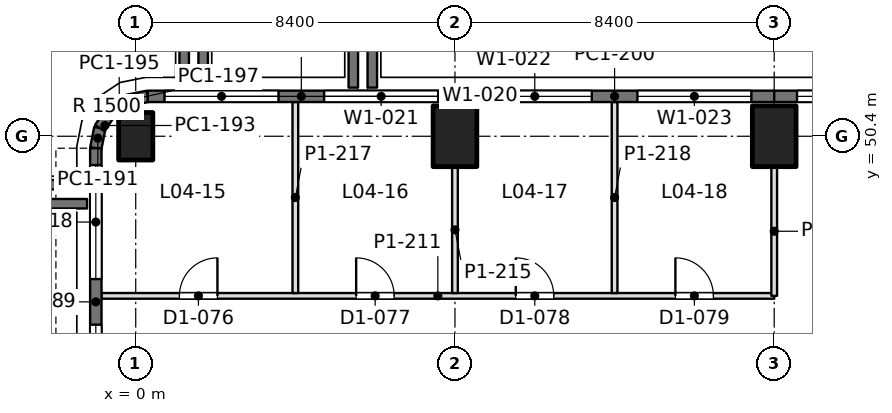
"""IFC4 building model, lengths in metres.
Left out: names, types, materials, properties, quantities, classifications, styles, units other than length and angle.
Written with IfcOpenShell. Run it as: python <this file> out.ifc"""

import sys

from ifc_helpers import new_model, si_unit, direction, frame, frame_2d, origin, origin_2d, place, context, subcontext, project, spatial, rectangle, extrude, element, fill, save


model = new_model("IFC4")
c1 = context("Model", 3, precision=1e-05, world=origin(), true_north=direction((0.0, 1.0)))
c2 = subcontext(c1, "Body", "Model", "MODEL_VIEW")
j1 = project(units=[si_unit("LENGTHUNIT", "METRE"), si_unit("PLANEANGLEUNIT", "RADIAN")], contexts=[c1])
p1 = place(None, origin())
s1 = spatial("IfcSite", under=j1, at=p1, CompositionType="ELEMENT")
p2 = place(p1, origin())
s2 = spatial("IfcBuilding", under=s1, at=p2, CompositionType="ELEMENT")
p3 = place(p2, frame((0.0, 0.0, 18.9)))
s3 = spatial("IfcBuildingStorey", under=s2, at=p3, CompositionType="ELEMENT", Elevation=18.9)
p4 = place(p3, frame((0.0, 50.4, 0.0), z_axis=(0.0, 0.0, 1.0), x_axis=(1.0, 0.0, 0.0)))
e1 = element("IfcColumn", 1, at=p4, inside=s3, PredefinedType="COLUMN", context=c2, shape_type="SweptSolid", body=[
    extrude(rectangle(XDim=0.9, YDim=1.25, at=origin_2d()), origin(), (0.0, 0.0, 1.0), 4.5),
])
for number, where, z_axis, x_axis in (
    (2, (8.4, 50.4, 0.0), (0.0, 0.0, 1.0), (1.0, 0.0, 0.0)),
    (3, (16.8, 50.4, 0.0), (0.0, 0.0, 1.0), (1.0, 0.0, 0.0)),
):
    element("IfcColumn", number, at=place(p3, frame(where, z_axis=z_axis, x_axis=x_axis)), inside=s3, PredefinedType="COLUMN", context=c2, shape_type="SweptSolid", body=[
        extrude(rectangle(XDim=1.15, YDim=1.6, at=origin_2d()), origin(), (0.0, 0.0, 1.0), 4.5),
    ])
p5 = place(p3, frame((-1.05, 42.0, 0.0), z_axis=(0.0, 0.0, 1.0), x_axis=(0.0, 1.0, 0.0)))
e4 = element("IfcWall", 4, at=p5, inside=s3, PredefinedType="SOLIDWALL", context=c2, shape_type="SweptSolid", body=[
    extrude(rectangle(XDim=8.085, YDim=0.3, at=frame_2d((4.042, 0.0))), origin(), (0.0, 0.0, 1.0), 4.34),
])
p6 = place(p5, frame((0.443, 0.0, 0.9)))
e5 = element("IfcOpeningElement", 5, at=p6, cuts=e4, PredefinedType="OPENING", context=c2, shape_type="SweptSolid", body=[
    extrude(rectangle(XDim=3.0, YDim=1.9, at=frame_2d((1.5, 0.95))), frame((0.0, 0.16, 0.0), z_axis=(0.0, -1.0, 0.0), x_axis=(1.0, 0.0, 0.0)), (0.0, 0.0, 1.0), 0.32),
])
p7 = place(p5, frame((4.643, 0.0, 0.9)))
e6 = element("IfcOpeningElement", 6, at=p7, cuts=e4, PredefinedType="OPENING", context=c2, shape_type="SweptSolid", body=[
    extrude(rectangle(XDim=3.0, YDim=1.9, at=frame_2d((1.5, 0.95))), frame((0.0, 0.16, 0.0), z_axis=(0.0, -1.0, 0.0), x_axis=(1.0, 0.0, 0.0)), (0.0, 0.0, 1.0), 0.32),
])
p8 = place(p3, frame((-1.05, 50.085, 0.0), z_axis=(0.0, 0.0, 1.0), x_axis=(0.195073962632, 0.980788534345, 0.0)))
e7 = element("IfcWall", 7, at=p8, inside=s3, PredefinedType="SOLIDWALL", context=c2, shape_type="SweptSolid", body=[
    extrude(rectangle(XDim=0.541, YDim=0.3, at=frame_2d((0.271, 0.0))), origin(), (0.0, 0.0, 1.0), 4.34),
])
for number, where, z_axis, x_axis in (
    (8, (-0.945, 50.615, 0.0), (0.0, 0.0, 1.0), (0.556, 0.831, 0.0)),
    (9, (-0.653, 51.052, 0.0), (0.0, 0.0, 1.0), (0.831, 0.556, 0.0)),
):
    element("IfcWall", number, at=place(p3, frame(where, z_axis=z_axis, x_axis=x_axis)), inside=s3, PredefinedType="SOLIDWALL", context=c2, shape_type="SweptSolid", body=[
        extrude(rectangle(XDim=0.526, YDim=0.3, at=frame_2d((0.263, 0.0))), origin(), (0.0, 0.0, 1.0), 4.34),
    ])
p9 = place(p3, frame((-0.216, 51.344, 0.0), z_axis=(0.0, 0.0, 1.0), x_axis=(0.980788534345, 0.195073962632, 0.0)))
e10 = element("IfcWall", 10, at=p9, inside=s3, PredefinedType="SOLIDWALL", context=c2, shape_type="SweptSolid", body=[
    extrude(rectangle(XDim=0.541, YDim=0.3, at=frame_2d((0.271, 0.0))), origin(), (0.0, 0.0, 1.0), 4.34),
])
p10 = place(p3, frame((0.315, 51.45, 0.0), z_axis=(0.0, 0.0, 1.0), x_axis=(1.0, 0.0, 0.0)))
e11 = element("IfcWall", 11, at=p10, inside=s3, PredefinedType="SOLIDWALL", context=c2, shape_type="SweptSolid", body=[
    extrude(rectangle(XDim=8.085, YDim=0.3, at=frame_2d((4.042, 0.0))), origin(), (0.0, 0.0, 1.0), 4.34),
])
p11 = place(p10, frame((0.443, 0.0, 0.9)))
e12 = element("IfcOpeningElement", 12, at=p11, cuts=e11, PredefinedType="OPENING", context=c2, shape_type="SweptSolid", body=[
    extrude(rectangle(XDim=3.0, YDim=1.9, at=frame_2d((1.5, 0.95))), frame((0.0, 0.16, 0.0), z_axis=(0.0, -1.0, 0.0), x_axis=(1.0, 0.0, 0.0)), (0.0, 0.0, 1.0), 0.32),
])
p12 = place(p10, frame((4.643, 0.0, 0.9)))
e13 = element("IfcOpeningElement", 13, at=p12, cuts=e11, PredefinedType="OPENING", context=c2, shape_type="SweptSolid", body=[
    extrude(rectangle(XDim=3.0, YDim=1.9, at=frame_2d((1.5, 0.95))), frame((0.0, 0.16, 0.0), z_axis=(0.0, -1.0, 0.0), x_axis=(1.0, 0.0, 0.0)), (0.0, 0.0, 1.0), 0.32),
])
p13 = place(p3, frame((8.4, 51.45, 0.0), z_axis=(0.0, 0.0, 1.0), x_axis=(1.0, 0.0, 0.0)))
e14 = element("IfcWall", 14, at=p13, inside=s3, PredefinedType="SOLIDWALL", context=c2, shape_type="SweptSolid", body=[
    extrude(rectangle(XDim=8.4, YDim=0.3, at=frame_2d((4.2, 0.0))), origin(), (0.0, 0.0, 1.0), 4.34),
])
p14 = place(p13, frame((0.6, 0.0, 0.9)))
e15 = element("IfcOpeningElement", 15, at=p14, cuts=e14, PredefinedType="OPENING", context=c2, shape_type="SweptSolid", body=[
    extrude(rectangle(XDim=3.0, YDim=1.9, at=frame_2d((1.5, 0.95))), frame((0.0, 0.16, 0.0), z_axis=(0.0, -1.0, 0.0), x_axis=(1.0, 0.0, 0.0)), (0.0, 0.0, 1.0), 0.32),
])
p15 = place(p13, frame((4.8, 0.0, 0.9)))
e16 = element("IfcOpeningElement", 16, at=p15, cuts=e14, PredefinedType="OPENING", context=c2, shape_type="SweptSolid", body=[
    extrude(rectangle(XDim=3.0, YDim=1.9, at=frame_2d((1.5, 0.95))), frame((0.0, 0.16, 0.0), z_axis=(0.0, -1.0, 0.0), x_axis=(1.0, 0.0, 0.0)), (0.0, 0.0, 1.0), 0.32),
])
p16 = place(p3, frame((16.8, 51.45, 0.0), z_axis=(0.0, 0.0, 1.0), x_axis=(1.0, 0.0, 0.0)))
e17 = element("IfcWall", 17, at=p16, inside=s3, PredefinedType="SOLIDWALL", context=c2, shape_type="SweptSolid", body=[
    extrude(rectangle(XDim=8.4, YDim=0.3, at=frame_2d((4.2, 0.0))), origin(), (0.0, 0.0, 1.0), 4.34),
])
p17 = place(p16, frame((0.6, 0.0, 0.9)))
e18 = element("IfcOpeningElement", 18, at=p17, cuts=e17, PredefinedType="OPENING", context=c2, shape_type="SweptSolid", body=[
    extrude(rectangle(XDim=3.0, YDim=1.9, at=frame_2d((1.5, 0.95))), frame((0.0, 0.16, 0.0), z_axis=(0.0, -1.0, 0.0), x_axis=(1.0, 0.0, 0.0)), (0.0, 0.0, 1.0), 0.32),
])
p18 = place(p16, frame((4.8, 0.0, 0.9)))
e19 = element("IfcOpeningElement", 19, at=p18, cuts=e17, PredefinedType="OPENING", context=c2, shape_type="SweptSolid", body=[
    extrude(rectangle(XDim=3.0, YDim=1.9, at=frame_2d((1.5, 0.95))), frame((0.0, 0.16, 0.0), z_axis=(0.0, -1.0, 0.0), x_axis=(1.0, 0.0, 0.0)), (0.0, 0.0, 1.0), 0.32),
])
for number, where, z_axis, x_axis in (
    (20, (6.225, 51.68, 0.0), (0.0, 0.0, 1.0), (0.0, 1.0, 0.0)),
    (21, (5.725, 59.68, 0.0), (0.0, 0.0, 1.0), (0.0, -1.0, 0.0)),
    (22, (1.775, 51.68, 0.0), (0.0, 0.0, 1.0), (0.0, 1.0, 0.0)),
    (23, (1.275, 59.68, 0.0), (0.0, 0.0, 1.0), (0.0, -1.0, 0.0)),
    (24, (-1.28, 49.125, 0.0), (0.0, 0.0, 1.0), (-1.0, 0.0, 0.0)),
    (25, (-9.28, 48.625, 0.0), (0.0, 0.0, 1.0), (1.0, 0.0, 0.0)),
):
    element("IfcWall", number, at=place(p3, frame(where, z_axis=z_axis, x_axis=x_axis)), inside=s3, PredefinedType="PARAPET", context=c2, shape_type="SweptSolid", body=[
        extrude(rectangle(XDim=8.0, YDim=0.25, at=frame_2d((4.0, 0.0))), origin(), (0.0, 0.0, 1.0), 1.1),
    ])
p19 = place(p3, frame((-0.902, 46.2, 0.0), z_axis=(0.0, 0.0, 1.0), x_axis=(1.0, 0.0, 0.0)))
e26 = element("IfcWall", 26, at=p19, inside=s3, PredefinedType="PARTITIONING", context=c2, shape_type="SweptSolid", body=[
    extrude(rectangle(XDim=17.702, YDim=0.15, at=frame_2d((8.851, 0.0))), origin(), (0.0, 0.0, 1.0), 3.74),
])
p20 = place(p19, frame((2.052, 0.0, 0.0)))
e27 = element("IfcOpeningElement", 27, at=p20, cuts=e26, PredefinedType="OPENING", context=c2, shape_type="SweptSolid", body=[
    extrude(rectangle(XDim=1.0, YDim=2.2, at=frame_2d((0.5, 1.1))), frame((0.0, 0.085, 0.0), z_axis=(0.0, -1.0, 0.0), x_axis=(1.0, 0.0, 0.0)), (0.0, 0.0, 1.0), 0.17),
])
p21 = place(p19, frame((6.702, 0.0, 0.0)))
e28 = element("IfcOpeningElement", 28, at=p21, cuts=e26, PredefinedType="OPENING", context=c2, shape_type="SweptSolid", body=[
    extrude(rectangle(XDim=1.0, YDim=2.2, at=frame_2d((0.5, 1.1))), frame((0.0, 0.085, 0.0), z_axis=(0.0, -1.0, 0.0), x_axis=(1.0, 0.0, 0.0)), (0.0, 0.0, 1.0), 0.17),
])
p22 = place(p19, frame((10.902, 0.0, 0.0)))
e29 = element("IfcOpeningElement", 29, at=p22, cuts=e26, PredefinedType="OPENING", context=c2, shape_type="SweptSolid", body=[
    extrude(rectangle(XDim=1.0, YDim=2.2, at=frame_2d((0.5, 1.1))), frame((0.0, 0.085, 0.0), z_axis=(0.0, -1.0, 0.0), x_axis=(1.0, 0.0, 0.0)), (0.0, 0.0, 1.0), 0.17),
])
p23 = place(p19, frame((15.102, 0.0, 0.0)))
e30 = element("IfcOpeningElement", 30, at=p23, cuts=e26, PredefinedType="OPENING", context=c2, shape_type="SweptSolid", body=[
    extrude(rectangle(XDim=1.0, YDim=2.2, at=frame_2d((0.5, 1.1))), frame((0.0, 0.085, 0.0), z_axis=(0.0, -1.0, 0.0), x_axis=(1.0, 0.0, 0.0)), (0.0, 0.0, 1.0), 0.17),
])
p24 = place(p3, frame((4.2, 46.274, 0.0), z_axis=(0.0, 0.0, 1.0), x_axis=(0.0, 1.0, 0.0)))
e31 = element("IfcWall", 31, at=p24, inside=s3, PredefinedType="PARTITIONING", context=c2, shape_type="SweptSolid", body=[
    extrude(rectangle(XDim=5.028, YDim=0.15, at=frame_2d((2.514, 0.0))), origin(), (0.0, 0.0, 1.0), 3.84),
])
p25 = place(p3, frame((8.4, 46.274, 0.0), z_axis=(0.0, 0.0, 1.0), x_axis=(0.0, 1.0, 0.0)))
e32 = element("IfcWall", 32, at=p25, inside=s3, PredefinedType="PARTITIONING", context=c2, shape_type="SweptSolid", body=[
    extrude(rectangle(XDim=3.327, YDim=0.15, at=frame_2d((1.664, 0.0))), origin(), (0.0, 0.0, 1.0), 3.74),
])
p26 = place(p3, frame((12.6, 46.274, 0.0), z_axis=(0.0, 0.0, 1.0), x_axis=(0.0, 1.0, 0.0)))
e33 = element("IfcWall", 33, at=p26, inside=s3, PredefinedType="PARTITIONING", context=c2, shape_type="SweptSolid", body=[
    extrude(rectangle(XDim=5.028, YDim=0.15, at=frame_2d((2.514, 0.0))), origin(), (0.0, 0.0, 1.0), 3.84),
])
p27 = place(p3, frame((16.8, 46.2, 0.0), z_axis=(0.0, 0.0, 1.0), x_axis=(0.0, 1.0, 0.0)))
e34 = element("IfcWall", 34, at=p27, inside=s3, PredefinedType="PARTITIONING", context=c2, shape_type="SweptSolid", body=[
    extrude(rectangle(XDim=3.401, YDim=0.15, at=frame_2d((1.701, 0.0))), origin(), (0.0, 0.0, 1.0), 3.74),
])
p28 = place(p6, origin())
e35 = element("IfcWindow", 35, at=p28, inside=s3, PartitioningType="SINGLE_PANEL", PredefinedType="WINDOW", context=c2, shape_type="SweptSolid", body=[
    extrude(rectangle(XDim=3.0, YDim=1.9, at=frame_2d((1.5, 0.95))), frame((0.0, 0.03, 0.0), z_axis=(0.0, -1.0, 0.0), x_axis=(1.0, 0.0, 0.0)), (0.0, 0.0, 1.0), 0.06),
])
fill(e5, e35)
p29 = place(p7, origin())
e36 = element("IfcWindow", 36, at=p29, inside=s3, PartitioningType="SINGLE_PANEL", PredefinedType="WINDOW", context=c2, shape_type="SweptSolid", body=[
    extrude(rectangle(XDim=3.0, YDim=1.9, at=frame_2d((1.5, 0.95))), frame((0.0, 0.03, 0.0), z_axis=(0.0, -1.0, 0.0), x_axis=(1.0, 0.0, 0.0)), (0.0, 0.0, 1.0), 0.06),
])
fill(e6, e36)
p30 = place(p11, origin())
e37 = element("IfcWindow", 37, at=p30, inside=s3, PartitioningType="SINGLE_PANEL", PredefinedType="WINDOW", context=c2, shape_type="SweptSolid", body=[
    extrude(rectangle(XDim=3.0, YDim=1.9, at=frame_2d((1.5, 0.95))), frame((0.0, 0.03, 0.0), z_axis=(0.0, -1.0, 0.0), x_axis=(1.0, 0.0, 0.0)), (0.0, 0.0, 1.0), 0.06),
])
fill(e12, e37)
p31 = place(p12, origin())
e38 = element("IfcWindow", 38, at=p31, inside=s3, PartitioningType="SINGLE_PANEL", PredefinedType="WINDOW", context=c2, shape_type="SweptSolid", body=[
    extrude(rectangle(XDim=3.0, YDim=1.9, at=frame_2d((1.5, 0.95))), frame((0.0, 0.03, 0.0), z_axis=(0.0, -1.0, 0.0), x_axis=(1.0, 0.0, 0.0)), (0.0, 0.0, 1.0), 0.06),
])
fill(e13, e38)
p32 = place(p14, origin())
e39 = element("IfcWindow", 39, at=p32, inside=s3, PartitioningType="SINGLE_PANEL", PredefinedType="WINDOW", context=c2, shape_type="SweptSolid", body=[
    extrude(rectangle(XDim=3.0, YDim=1.9, at=frame_2d((1.5, 0.95))), frame((0.0, 0.03, 0.0), z_axis=(0.0, -1.0, 0.0), x_axis=(1.0, 0.0, 0.0)), (0.0, 0.0, 1.0), 0.06),
])
fill(e15, e39)
p33 = place(p15, origin())
e40 = element("IfcWindow", 40, at=p33, inside=s3, PartitioningType="SINGLE_PANEL", PredefinedType="WINDOW", context=c2, shape_type="SweptSolid", body=[
    extrude(rectangle(XDim=3.0, YDim=1.9, at=frame_2d((1.5, 0.95))), frame((0.0, 0.03, 0.0), z_axis=(0.0, -1.0, 0.0), x_axis=(1.0, 0.0, 0.0)), (0.0, 0.0, 1.0), 0.06),
])
fill(e16, e40)
p34 = place(p17, origin())
e41 = element("IfcWindow", 41, at=p34, inside=s3, PartitioningType="SINGLE_PANEL", PredefinedType="WINDOW", context=c2, shape_type="SweptSolid", body=[
    extrude(rectangle(XDim=3.0, YDim=1.9, at=frame_2d((1.5, 0.95))), frame((0.0, 0.03, 0.0), z_axis=(0.0, -1.0, 0.0), x_axis=(1.0, 0.0, 0.0)), (0.0, 0.0, 1.0), 0.06),
])
fill(e18, e41)
p35 = place(p20, origin())
e42 = element("IfcDoor", 42, at=p35, inside=s3, OperationType="SINGLE_SWING_RIGHT", PredefinedType="DOOR", context=c2, shape_type="SweptSolid", body=[
    extrude(rectangle(XDim=1.0, YDim=2.2, at=frame_2d((0.5, 1.1))), frame((0.0, 0.025, 0.0), z_axis=(0.0, -1.0, 0.0), x_axis=(1.0, 0.0, 0.0)), (0.0, 0.0, 1.0), 0.05),
])
fill(e27, e42)
p36 = place(p21, origin())
e43 = element("IfcDoor", 43, at=p36, inside=s3, OperationType="SINGLE_SWING_LEFT", PredefinedType="DOOR", context=c2, shape_type="SweptSolid", body=[
    extrude(rectangle(XDim=1.0, YDim=2.2, at=frame_2d((0.5, 1.1))), frame((0.0, 0.025, 0.0), z_axis=(0.0, -1.0, 0.0), x_axis=(1.0, 0.0, 0.0)), (0.0, 0.0, 1.0), 0.05),
])
fill(e28, e43)
p37 = place(p22, origin())
e44 = element("IfcDoor", 44, at=p37, inside=s3, OperationType="SINGLE_SWING_LEFT", PredefinedType="DOOR", context=c2, shape_type="SweptSolid", body=[
    extrude(rectangle(XDim=1.0, YDim=2.2, at=frame_2d((0.5, 1.1))), frame((0.0, 0.025, 0.0), z_axis=(0.0, -1.0, 0.0), x_axis=(1.0, 0.0, 0.0)), (0.0, 0.0, 1.0), 0.05),
])
fill(e29, e44)
p38 = place(p23, origin())
e45 = element("IfcDoor", 45, at=p38, inside=s3, OperationType="SINGLE_SWING_LEFT", PredefinedType="DOOR", context=c2, shape_type="SweptSolid", body=[
    extrude(rectangle(XDim=1.0, YDim=2.2, at=frame_2d((0.5, 1.1))), frame((0.0, 0.025, 0.0), z_axis=(0.0, -1.0, 0.0), x_axis=(1.0, 0.0, 0.0)), (0.0, 0.0, 1.0), 0.05),
])
fill(e30, e45)
save(model, sys.argv[1])
